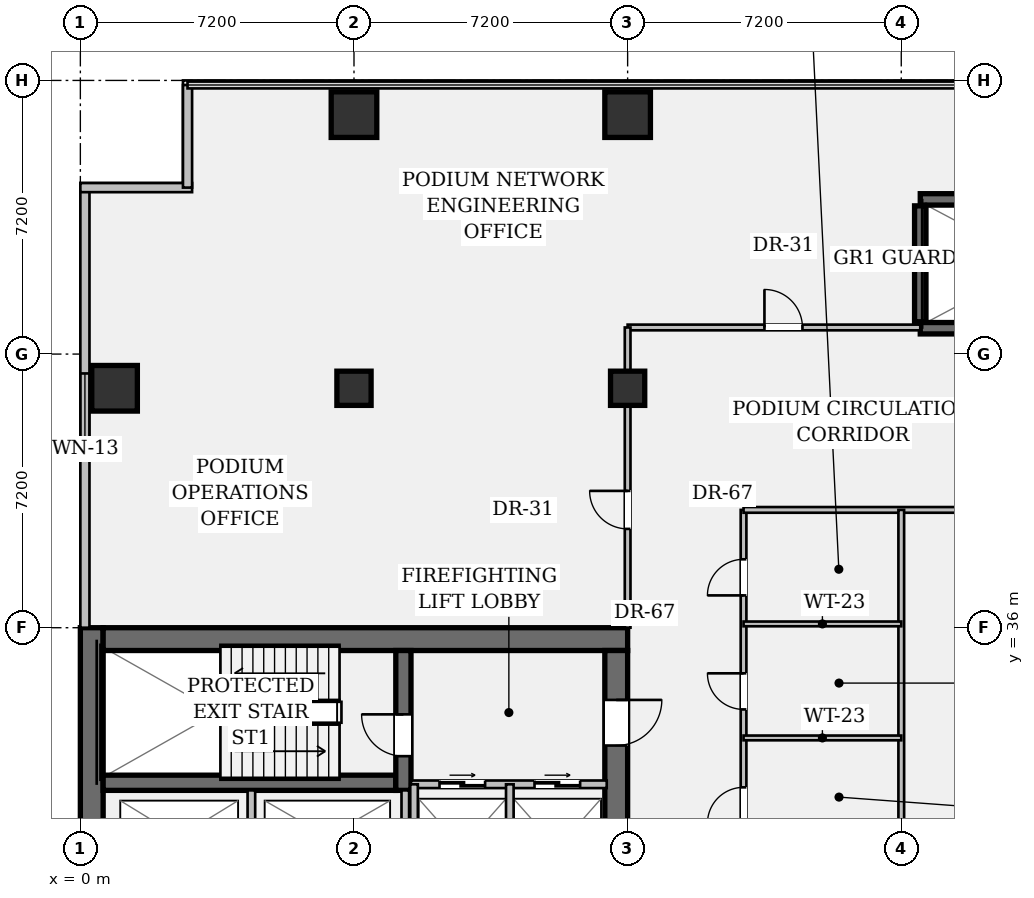
"""IFC4 building model, lengths in metres.
Left out: names, types, materials, properties, quantities, classifications, styles, units other than length and angle.
Written with IfcOpenShell. Run it as: python <this file> out.ifc"""

import sys

from ifc_helpers import new_model, si_unit, direction, frame, frame_2d, origin, origin_2d, place, context, subcontext, project, spatial, rectangle, hollow_rectangle, extrude, element, fill, save


model = new_model("IFC4")
c1 = context("Model", 3, precision=1e-05, world=origin(), true_north=direction((0.0, 1.0)))
c2 = subcontext(c1, "Body", "Model", "MODEL_VIEW")
j1 = project(units=[si_unit("LENGTHUNIT", "METRE"), si_unit("PLANEANGLEUNIT", "RADIAN")], contexts=[c1])
p1 = place(None, origin())
s1 = spatial("IfcSite", under=j1, at=p1, CompositionType="ELEMENT")
p2 = place(p1, origin())
s2 = spatial("IfcBuilding", under=s1, at=p2, CompositionType="ELEMENT")
p3 = place(p2, frame((0.0, 0.0, 13.65)))
s3 = spatial("IfcBuildingStorey", under=s2, at=p3, CompositionType="ELEMENT", Elevation=13.65)
p4 = place(p3, frame((0.3, 7.2, 0.0), z_axis=(0.0, 0.0, 1.0), x_axis=(0.0, 1.0, 0.0)))
e1 = element("IfcWall", 1, at=p4, inside=s3, PredefinedType="SHEAR", context=c2, shape_type="SweptSolid", body=[
    extrude(rectangle(XDim=28.8, YDim=0.6, at=frame_2d((14.4, 0.0))), origin(), (0.0, 0.0, 1.0), 3.91),
])
p5 = place(p3, frame((0.6, 35.7, 0.0), z_axis=(0.0, 0.0, 1.0), x_axis=(1.0, 0.0, 0.0)))
e2 = element("IfcWall", 2, at=p5, inside=s3, PredefinedType="SHEAR", context=c2, shape_type="SweptSolid", body=[
    extrude(rectangle(XDim=13.8, YDim=0.6, at=frame_2d((6.9, 0.0))), origin(), (0.0, 0.0, 1.0), 3.91),
])
p6 = place(p3, frame((14.1, 35.4, 0.0), z_axis=(0.0, 0.0, 1.0), x_axis=(0.0, -1.0, 0.0)))
e3 = element("IfcWall", 3, at=p6, inside=s3, PredefinedType="SHEAR", context=c2, shape_type="SweptSolid", body=[
    extrude(rectangle(XDim=27.6, YDim=0.6, at=frame_2d((13.8, 0.0))), origin(), (0.0, 0.0, 1.0), 3.91),
])
p7 = place(p6, frame((1.3, 0.0, 0.0)))
e4 = element("IfcOpeningElement", 4, at=p7, cuts=e3, PredefinedType="OPENING", context=c2, shape_type="SweptSolid", body=[
    extrude(rectangle(XDim=1.2, YDim=2.15, at=frame_2d((0.6, 1.075))), frame((0.0, 0.312, 0.0), z_axis=(0.0, -1.0, 0.0), x_axis=(1.0, 0.0, 0.0)), (0.0, 0.0, 1.0), 0.624),
])
p8 = place(p6, frame((25.25, 0.0, 0.0)))
e5 = element("IfcOpeningElement", 5, at=p8, cuts=e3, PredefinedType="OPENING", context=c2, shape_type="SweptSolid", body=[
    extrude(rectangle(XDim=1.2, YDim=2.15, at=frame_2d((0.6, 1.075))), frame((0.0, 0.312, 0.0), z_axis=(0.0, -1.0, 0.0), x_axis=(1.0, 0.0, 0.0)), (0.0, 0.0, 1.0), 0.624),
])
p9 = place(p6, frame((14.6, 0.0, 0.0)))
e6 = element("IfcOpeningElement", 6, at=p9, cuts=e3, PredefinedType="OPENING", context=c2, shape_type="SweptSolid", body=[
    extrude(rectangle(XDim=1.6, YDim=2.2, at=frame_2d((0.8, 1.1))), frame((0.0, 0.312, 0.0), z_axis=(0.0, -1.0, 0.0), x_axis=(1.0, 0.0, 0.0)), (0.0, 0.0, 1.0), 0.624),
])
p10 = place(p3, frame((0.6, 31.92, 0.0), z_axis=(0.0, 0.0, 1.0), x_axis=(1.0, 0.0, 0.0)))
e7 = element("IfcWall", 7, at=p10, inside=s3, PredefinedType="SHEAR", context=c2, shape_type="SweptSolid", body=[
    extrude(rectangle(XDim=7.7, YDim=0.4, at=frame_2d((3.85, 0.0))), origin(), (0.0, 0.0, 1.0), 3.91),
])
p11 = place(p3, frame((8.5, 31.72, 0.0), z_axis=(0.0, 0.0, 1.0), x_axis=(0.0, 1.0, 0.0)))
e8 = element("IfcWall", 8, at=p11, inside=s3, PredefinedType="SHEAR", context=c2, shape_type="SweptSolid", body=[
    extrude(rectangle(XDim=3.68, YDim=0.4, at=frame_2d((1.84, 0.0))), origin(), (0.0, 0.0, 1.0), 3.91),
])
p12 = place(p11, frame((0.9, 0.0, 0.0)))
e9 = element("IfcOpeningElement", 9, at=p12, cuts=e8, PredefinedType="OPENING", context=c2, shape_type="SweptSolid", body=[
    extrude(rectangle(XDim=1.1, YDim=2.15, at=frame_2d((0.55, 1.075))), frame((0.0, 0.212, 0.0), z_axis=(0.0, -1.0, 0.0), x_axis=(1.0, 0.0, 0.0)), (0.0, 0.0, 1.0), 0.424),
])
p13 = place(p3, frame((22.1, 43.88, 0.0), z_axis=(0.0, 0.0, 1.0), x_axis=(1.0, 0.0, 0.0)))
e10 = element("IfcWall", 10, at=p13, inside=s3, PredefinedType="SHEAR", context=c2, shape_type="SweptSolid", body=[
    extrude(rectangle(XDim=8.15, YDim=0.3, at=frame_2d((4.075, 0.0))), origin(), (0.0, 0.0, 1.0), 3.91),
])
p14 = place(p13, frame((6.45, 0.0, 0.0)))
e11 = element("IfcOpeningElement", 11, at=p14, cuts=e10, PredefinedType="OPENING", context=c2, shape_type="SweptSolid", body=[
    extrude(rectangle(XDim=1.1, YDim=2.15, at=frame_2d((0.55, 1.075))), frame((0.0, 0.162, 0.0), z_axis=(0.0, -1.0, 0.0), x_axis=(1.0, 0.0, 0.0)), (0.0, 0.0, 1.0), 0.324),
])
p15 = place(p3, frame((22.1, 47.27, 0.0), z_axis=(0.0, 0.0, 1.0), x_axis=(1.0, 0.0, 0.0)))
e12 = element("IfcWall", 12, at=p15, inside=s3, PredefinedType="SHEAR", context=c2, shape_type="SweptSolid", body=[
    extrude(rectangle(XDim=8.15, YDim=0.3, at=frame_2d((4.075, 0.0))), origin(), (0.0, 0.0, 1.0), 3.91),
])
p16 = place(p3, frame((22.1, 44.05, 0.0), z_axis=(0.0, 0.0, 1.0), x_axis=(0.0, 1.0, 0.0)))
e13 = element("IfcWall", 13, at=p16, inside=s3, PredefinedType="SHEAR", context=c2, shape_type="SweptSolid", body=[
    extrude(rectangle(XDim=3.05, YDim=0.3, at=frame_2d((1.525, 0.0))), origin(), (0.0, 0.0, 1.0), 3.91),
])
p17 = place(p3, frame((0.9, 42.3, 0.0), z_axis=(0.0, 0.0, 1.0), x_axis=(1.0, 0.0, 0.0)))
e14 = element("IfcColumn", 14, at=p17, inside=s3, PredefinedType="COLUMN", context=c2, shape_type="SweptSolid", body=[
    extrude(hollow_rectangle(XDim=1.2, YDim=1.2, WallThickness=0.075, at=origin_2d()), origin(), (0.0, 0.0, 1.0), 3.91),
])
p18 = place(p3, frame((7.2, 42.3, 0.0), z_axis=(0.0, 0.0, 1.0), x_axis=(1.0, 0.0, 0.0)))
e15 = element("IfcColumn", 15, at=p18, inside=s3, PredefinedType="COLUMN", context=c2, shape_type="SweptSolid", body=[
    extrude(rectangle(XDim=0.9, YDim=0.9, at=origin_2d()), origin(), (0.0, 0.0, 1.0), 3.91),
])
p19 = place(p3, frame((7.2, 49.5, 0.0), z_axis=(0.0, 0.0, 1.0), x_axis=(1.0, 0.0, 0.0)))
e16 = element("IfcColumn", 16, at=p19, inside=s3, PredefinedType="COLUMN", context=c2, shape_type="SweptSolid", body=[
    extrude(hollow_rectangle(XDim=1.2, YDim=1.2, WallThickness=0.075, at=origin_2d()), origin(), (0.0, 0.0, 1.0), 3.91),
])
p20 = place(p3, frame((14.4, 42.3, 0.0), z_axis=(0.0, 0.0, 1.0), x_axis=(1.0, 0.0, 0.0)))
e17 = element("IfcColumn", 17, at=p20, inside=s3, PredefinedType="COLUMN", context=c2, shape_type="SweptSolid", body=[
    extrude(rectangle(XDim=0.9, YDim=0.9, at=origin_2d()), origin(), (0.0, 0.0, 1.0), 3.91),
])
p21 = place(p3, frame((14.4, 49.5, 0.0), z_axis=(0.0, 0.0, 1.0), x_axis=(1.0, 0.0, 0.0)))
e18 = element("IfcColumn", 18, at=p21, inside=s3, PredefinedType="COLUMN", context=c2, shape_type="SweptSolid", body=[
    extrude(hollow_rectangle(XDim=1.2, YDim=1.2, WallThickness=0.075, at=origin_2d()), origin(), (0.0, 0.0, 1.0), 3.91),
])
p22 = place(p3, frame((0.12, 36.0, 0.0), z_axis=(0.0, 0.0, 1.0), x_axis=(0.0, 1.0, 0.0)))
e19 = element("IfcWall", 19, at=p22, inside=s3, PredefinedType="STANDARD", context=c2, shape_type="SweptSolid", body=[
    extrude(rectangle(XDim=11.58, YDim=0.24, at=frame_2d((5.79, 0.0))), origin(), (0.0, 0.0, 1.0), 3.91),
])
p23 = place(p22, frame((4.89, 0.0, 0.95)))
e20 = element("IfcOpeningElement", 20, at=p23, cuts=e19, PredefinedType="OPENING", context=c2, shape_type="SweptSolid", body=[
    extrude(rectangle(XDim=1.8, YDim=1.8, at=frame_2d((0.9, 0.9))), frame((0.0, 0.132, 0.0), z_axis=(0.0, -1.0, 0.0), x_axis=(1.0, 0.0, 0.0)), (0.0, 0.0, 1.0), 0.264),
])
p24 = place(p3, frame((0.0, 47.58, 0.0), z_axis=(0.0, 0.0, 1.0), x_axis=(1.0, 0.0, 0.0)))
e21 = element("IfcWall", 21, at=p24, inside=s3, PredefinedType="STANDARD", context=c2, shape_type="SweptSolid", body=[
    extrude(rectangle(XDim=2.94, YDim=0.24, at=frame_2d((1.47, 0.0))), origin(), (0.0, 0.0, 1.0), 3.91),
])
p25 = place(p3, frame((2.82, 47.58, 0.0), z_axis=(0.0, 0.0, 1.0), x_axis=(0.0, 1.0, 0.0)))
e22 = element("IfcWall", 22, at=p25, inside=s3, PredefinedType="STANDARD", context=c2, shape_type="SweptSolid", body=[
    extrude(rectangle(XDim=2.7, YDim=0.24, at=frame_2d((1.35, 0.0))), origin(), (0.0, 0.0, 1.0), 3.91),
])
p26 = place(p3, frame((8.7, 31.88, 0.0), z_axis=(0.0, 0.0, 1.0), x_axis=(1.0, 0.0, 0.0)))
e23 = element("IfcWall", 23, at=p26, inside=s3, PredefinedType="PARTITIONING", context=c2, shape_type="SweptSolid", body=[
    extrude(rectangle(XDim=5.15, YDim=0.2, at=frame_2d((2.575, 0.0))), origin(), (0.0, 0.0, 1.0), 3.91),
])
p27 = place(p26, frame((0.75, 0.0, 0.0)))
e24 = element("IfcOpeningElement", 24, at=p27, cuts=e23, PredefinedType="OPENING", context=c2, shape_type="SweptSolid", body=[
    extrude(rectangle(XDim=1.2, YDim=2.2, at=frame_2d((0.6, 1.1))), frame((0.0, 0.112, 0.0), z_axis=(0.0, -1.0, 0.0), x_axis=(1.0, 0.0, 0.0)), (0.0, 0.0, 1.0), 0.224),
])
p28 = place(p26, frame((3.25, 0.0, 0.0)))
e25 = element("IfcOpeningElement", 25, at=p28, cuts=e23, PredefinedType="OPENING", context=c2, shape_type="SweptSolid", body=[
    extrude(rectangle(XDim=1.2, YDim=2.2, at=frame_2d((0.6, 1.1))), frame((0.0, 0.112, 0.0), z_axis=(0.0, -1.0, 0.0), x_axis=(1.0, 0.0, 0.0)), (0.0, 0.0, 1.0), 0.224),
])
for number, where, z_axis, x_axis in (
    (26, (8.78, 28.78, 0.0), (0.0, 0.0, 1.0), (0.0, 1.0, 0.0)),
    (27, (11.3, 28.78, 0.0), (0.0, 0.0, 1.0), (0.0, 1.0, 0.0)),
):
    element("IfcWall", number, at=place(p3, frame(where, z_axis=z_axis, x_axis=x_axis)), inside=s3, PredefinedType="PARTITIONING", context=c2, shape_type="SweptSolid", body=[
        extrude(rectangle(XDim=3.1, YDim=0.2, at=frame_2d((1.55, 0.0))), origin(), (0.0, 0.0, 1.0), 3.91),
    ])
for number, where, z_axis, x_axis in (
    (28, (4.5, 28.78, 0.0), (0.0, 0.0, 1.0), (0.0, 1.0, 0.0)),
    (29, (8.55, 28.78, 0.0), (0.0, 0.0, 1.0), (0.0, 1.0, 0.0)),
):
    element("IfcWall", number, at=place(p3, frame(where, z_axis=z_axis, x_axis=x_axis)), inside=s3, PredefinedType="PARTITIONING", context=c2, shape_type="SweptSolid", body=[
        extrude(rectangle(XDim=2.94, YDim=0.2, at=frame_2d((1.47, 0.0))), origin(), (0.0, 0.0, 1.0), 3.91),
    ])
p29 = place(p3, frame((17.45, 17.55, 0.0), z_axis=(0.0, 0.0, 1.0), x_axis=(0.0, 1.0, 0.0)))
e30 = element("IfcWall", 30, at=p29, inside=s3, PredefinedType="PARTITIONING", context=c2, shape_type="SweptSolid", body=[
    extrude(rectangle(XDim=21.55, YDim=0.15, at=frame_2d((10.775, 0.0))), origin(), (0.0, 0.0, 1.0), 2.968),
])
p30 = place(p29, frame((19.3, 0.0, 0.0)))
e31 = element("IfcOpeningElement", 31, at=p30, cuts=e30, PredefinedType="OPENING", context=c2, shape_type="SweptSolid", body=[
    extrude(rectangle(XDim=0.95, YDim=2.15, at=frame_2d((0.475, 1.075))), frame((0.0, 0.087, 0.0), z_axis=(0.0, -1.0, 0.0), x_axis=(1.0, 0.0, 0.0)), (0.0, 0.0, 1.0), 0.174),
])
p31 = place(p29, frame((16.3, 0.0, 0.0)))
e32 = element("IfcOpeningElement", 32, at=p31, cuts=e30, PredefinedType="OPENING", context=c2, shape_type="SweptSolid", body=[
    extrude(rectangle(XDim=0.95, YDim=2.15, at=frame_2d((0.475, 1.075))), frame((0.0, 0.087, 0.0), z_axis=(0.0, -1.0, 0.0), x_axis=(1.0, 0.0, 0.0)), (0.0, 0.0, 1.0), 0.174),
])
p32 = place(p29, frame((13.3, 0.0, 0.0)))
e33 = element("IfcOpeningElement", 33, at=p32, cuts=e30, PredefinedType="OPENING", context=c2, shape_type="SweptSolid", body=[
    extrude(rectangle(XDim=0.95, YDim=2.15, at=frame_2d((0.475, 1.075))), frame((0.0, 0.087, 0.0), z_axis=(0.0, -1.0, 0.0), x_axis=(1.0, 0.0, 0.0)), (0.0, 0.0, 1.0), 0.174),
])
p33 = place(p29, frame((10.1, 0.0, 0.0)))
e34 = element("IfcOpeningElement", 34, at=p33, cuts=e30, PredefinedType="OPENING", context=c2, shape_type="SweptSolid", body=[
    extrude(rectangle(XDim=0.95, YDim=2.15, at=frame_2d((0.475, 1.075))), frame((0.0, 0.087, 0.0), z_axis=(0.0, -1.0, 0.0), x_axis=(1.0, 0.0, 0.0)), (0.0, 0.0, 1.0), 0.174),
])
p34 = place(p3, frame((14.4, 43.9, 0.0), z_axis=(0.0, 0.0, 1.0), x_axis=(1.0, 0.0, 0.0)))
e35 = element("IfcWall", 35, at=p34, inside=s3, PredefinedType="PARTITIONING", context=c2, shape_type="SweptSolid", body=[
    extrude(rectangle(XDim=7.7, YDim=0.15, at=frame_2d((3.85, 0.0))), origin(), (0.0, 0.0, 1.0), 2.968),
])
p35 = place(p34, frame((3.6, 0.0, 0.0)))
e36 = element("IfcOpeningElement", 36, at=p35, cuts=e35, PredefinedType="OPENING", context=c2, shape_type="SweptSolid", body=[
    extrude(rectangle(XDim=1.0, YDim=2.15, at=frame_2d((0.5, 1.075))), frame((0.0, 0.087, 0.0), z_axis=(0.0, -1.0, 0.0), x_axis=(1.0, 0.0, 0.0)), (0.0, 0.0, 1.0), 0.174),
])
p36 = place(p3, frame((17.45, 39.1, 0.0), z_axis=(0.0, 0.0, 1.0), x_axis=(1.0, 0.0, 0.0)))
e37 = element("IfcWall", 37, at=p36, inside=s3, PredefinedType="PARTITIONING", context=c2, shape_type="SweptSolid", body=[
    extrude(rectangle(XDim=32.83, YDim=0.15, at=frame_2d((16.415, 0.0))), origin(), (0.0, 0.0, 1.0), 2.968),
])
p37 = place(p36, frame((6.2, 0.0, 0.0)))
e38 = element("IfcOpeningElement", 38, at=p37, cuts=e37, PredefinedType="OPENING", context=c2, shape_type="SweptSolid", body=[
    extrude(rectangle(XDim=1.05, YDim=2.15, at=frame_2d((0.525, 1.075))), frame((0.0, 0.087, 0.0), z_axis=(0.0, -1.0, 0.0), x_axis=(1.0, 0.0, 0.0)), (0.0, 0.0, 1.0), 0.174),
])
p38 = place(p3, frame((21.6, 26.8, 0.0), z_axis=(0.0, 0.0, 1.0), x_axis=(0.0, 1.0, 0.0)))
e39 = element("IfcWall", 39, at=p38, inside=s3, PredefinedType="PARTITIONING", context=c2, shape_type="SweptSolid", body=[
    extrude(rectangle(XDim=12.3, YDim=0.15, at=frame_2d((6.15, 0.0))), origin(), (0.0, 0.0, 1.0), 2.968),
])
p39 = place(p3, frame((17.45, 36.1, 0.0), z_axis=(0.0, 0.0, 1.0), x_axis=(1.0, 0.0, 0.0)))
e40 = element("IfcWall", 40, at=p39, inside=s3, PredefinedType="PARTITIONING", context=c2, shape_type="SweptSolid", body=[
    extrude(rectangle(XDim=4.15, YDim=0.125, at=frame_2d((2.075, 0.0))), origin(), (0.0, 0.0, 1.0), 2.968),
])
p40 = place(p3, frame((17.45, 33.1, 0.0), z_axis=(0.0, 0.0, 1.0), x_axis=(1.0, 0.0, 0.0)))
e41 = element("IfcWall", 41, at=p40, inside=s3, PredefinedType="PARTITIONING", context=c2, shape_type="SweptSolid", body=[
    extrude(rectangle(XDim=4.15, YDim=0.125, at=frame_2d((2.075, 0.0))), origin(), (0.0, 0.0, 1.0), 3.428),
])
p41 = place(p3, frame((14.4, 36.0, 0.0), z_axis=(0.0, 0.0, 1.0), x_axis=(0.0, 1.0, 0.0)))
e42 = element("IfcWall", 42, at=p41, inside=s3, PredefinedType="PARTITIONING", context=c2, shape_type="SweptSolid", body=[
    extrude(rectangle(XDim=7.9, YDim=0.15, at=frame_2d((3.95, 0.0))), origin(), (0.0, 0.0, 1.0), 2.968),
])
p42 = place(p41, frame((2.6, 0.0, 0.0)))
e43 = element("IfcOpeningElement", 43, at=p42, cuts=e42, PredefinedType="OPENING", context=c2, shape_type="SweptSolid", body=[
    extrude(rectangle(XDim=1.0, YDim=2.15, at=frame_2d((0.5, 1.075))), frame((0.0, 0.087, 0.0), z_axis=(0.0, -1.0, 0.0), x_axis=(1.0, 0.0, 0.0)), (0.0, 0.0, 1.0), 0.174),
])
p43 = place(p23, origin())
e44 = element("IfcWindow", 44, at=p43, inside=s3, PartitioningType="SINGLE_PANEL", PredefinedType="WINDOW", context=c2, shape_type="SweptSolid", body=[
    extrude(rectangle(XDim=1.8, YDim=1.8, at=frame_2d((0.9, 0.9))), frame((0.0, 0.03, 0.0), z_axis=(0.0, -1.0, 0.0), x_axis=(1.0, 0.0, 0.0)), (0.0, 0.0, 1.0), 0.06),
])
fill(e20, e44)
p44 = place(p12, origin())
e45 = element("IfcDoor", 45, at=p44, inside=s3, OperationType="SINGLE_SWING_RIGHT", PredefinedType="DOOR", context=c2, shape_type="SweptSolid", body=[
    extrude(rectangle(XDim=1.1, YDim=2.15, at=frame_2d((0.55, 1.075))), frame((0.0, 0.025, 0.0), z_axis=(0.0, -1.0, 0.0), x_axis=(1.0, 0.0, 0.0)), (0.0, 0.0, 1.0), 0.05),
])
fill(e9, e45)
p45 = place(p7, origin())
e46 = element("IfcDoor", 46, at=p45, inside=s3, OperationType="SINGLE_SWING_LEFT", PredefinedType="DOOR", context=c2, shape_type="SweptSolid", body=[
    extrude(rectangle(XDim=1.2, YDim=2.15, at=frame_2d((0.6, 1.075))), frame((0.0, 0.025, 0.0), z_axis=(0.0, -1.0, 0.0), x_axis=(1.0, 0.0, 0.0)), (0.0, 0.0, 1.0), 0.05),
])
fill(e4, e46)
p46 = place(p27, origin())
e47 = element("IfcDoor", 47, at=p46, inside=s3, OperationType="DOUBLE_DOOR_SLIDING", PredefinedType="DOOR", context=c2, shape_type="SweptSolid", body=[
    extrude(rectangle(XDim=1.2, YDim=2.2, at=frame_2d((0.6, 1.1))), frame((0.0, 0.025, 0.0), z_axis=(0.0, -1.0, 0.0), x_axis=(1.0, 0.0, 0.0)), (0.0, 0.0, 1.0), 0.05),
])
fill(e24, e47)
p47 = place(p28, origin())
e48 = element("IfcDoor", 48, at=p47, inside=s3, OperationType="DOUBLE_DOOR_SLIDING", PredefinedType="DOOR", context=c2, shape_type="SweptSolid", body=[
    extrude(rectangle(XDim=1.2, YDim=2.2, at=frame_2d((0.6, 1.1))), frame((0.0, 0.025, 0.0), z_axis=(0.0, -1.0, 0.0), x_axis=(1.0, 0.0, 0.0)), (0.0, 0.0, 1.0), 0.05),
])
fill(e25, e48)
p48 = place(p30, origin())
e49 = element("IfcDoor", 49, at=p48, inside=s3, OperationType="SINGLE_SWING_LEFT", PredefinedType="DOOR", context=c2, shape_type="SweptSolid", body=[
    extrude(rectangle(XDim=0.95, YDim=2.15, at=frame_2d((0.475, 1.075))), frame((0.0, 0.025, 0.0), z_axis=(0.0, -1.0, 0.0), x_axis=(1.0, 0.0, 0.0)), (0.0, 0.0, 1.0), 0.05),
])
fill(e31, e49)
p49 = place(p31, origin())
e50 = element("IfcDoor", 50, at=p49, inside=s3, OperationType="SINGLE_SWING_RIGHT", PredefinedType="DOOR", context=c2, shape_type="SweptSolid", body=[
    extrude(rectangle(XDim=0.95, YDim=2.15, at=frame_2d((0.475, 1.075))), frame((0.0, 0.025, 0.0), z_axis=(0.0, -1.0, 0.0), x_axis=(1.0, 0.0, 0.0)), (0.0, 0.0, 1.0), 0.05),
])
fill(e32, e50)
p50 = place(p32, origin())
e51 = element("IfcDoor", 51, at=p50, inside=s3, OperationType="SINGLE_SWING_LEFT", PredefinedType="DOOR", context=c2, shape_type="SweptSolid", body=[
    extrude(rectangle(XDim=0.95, YDim=2.15, at=frame_2d((0.475, 1.075))), frame((0.0, 0.025, 0.0), z_axis=(0.0, -1.0, 0.0), x_axis=(1.0, 0.0, 0.0)), (0.0, 0.0, 1.0), 0.05),
])
fill(e33, e51)
p51 = place(p35, origin())
e52 = element("IfcDoor", 52, at=p51, inside=s3, OperationType="SINGLE_SWING_LEFT", PredefinedType="DOOR", context=c2, shape_type="SweptSolid", body=[
    extrude(rectangle(XDim=1.0, YDim=2.15, at=frame_2d((0.5, 1.075))), frame((0.0, 0.025, 0.0), z_axis=(0.0, -1.0, 0.0), x_axis=(1.0, 0.0, 0.0)), (0.0, 0.0, 1.0), 0.05),
])
fill(e36, e52)
p52 = place(p42, origin())
e53 = element("IfcDoor", 53, at=p52, inside=s3, OperationType="SINGLE_SWING_RIGHT", PredefinedType="DOOR", context=c2, shape_type="SweptSolid", body=[
    extrude(rectangle(XDim=1.0, YDim=2.15, at=frame_2d((0.5, 1.075))), frame((0.0, 0.025, 0.0), z_axis=(0.0, -1.0, 0.0), x_axis=(1.0, 0.0, 0.0)), (0.0, 0.0, 1.0), 0.05),
])
fill(e43, e53)
save(model, sys.argv[1])
